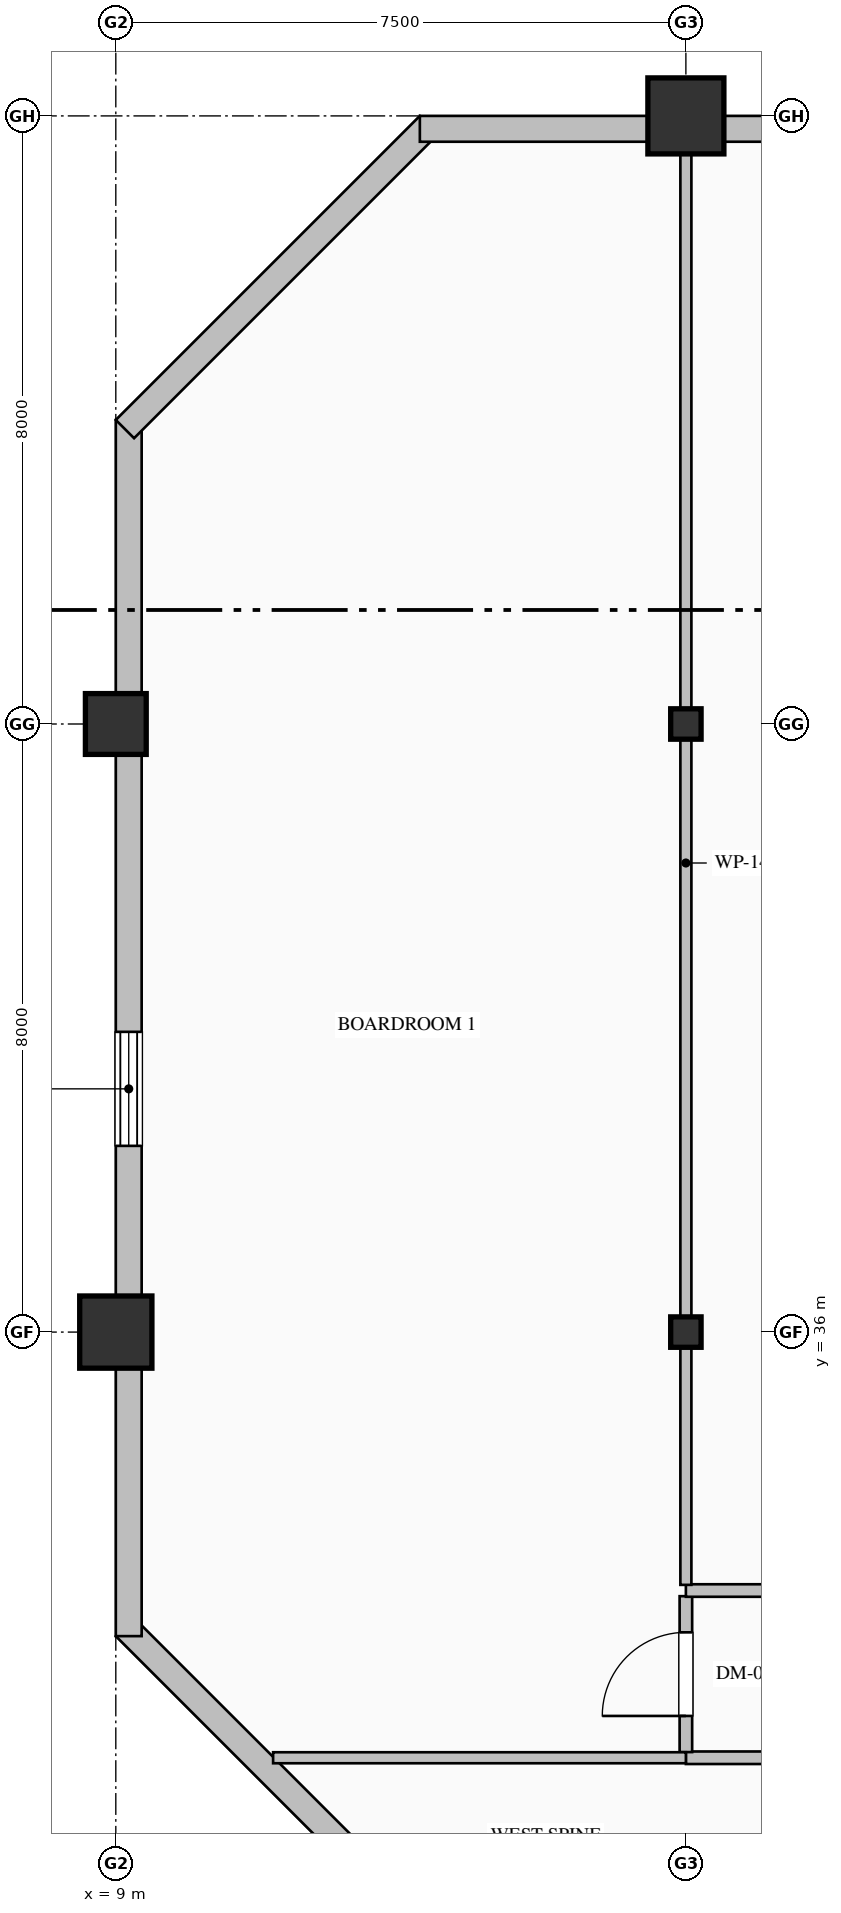
"""IFC4 building model, lengths in metres.
Left out: names, types, materials, properties, quantities, classifications, styles, units other than length and angle.
Written with IfcOpenShell. Run it as: python <this file> out.ifc"""

import sys

from ifc_helpers import new_model, si_unit, direction, frame, frame_2d, origin, origin_2d, place, context, subcontext, project, spatial, rectangle, hollow_rectangle, hollow_circle, i_section, extrude, element, fill, save


model = new_model("IFC4")
c1 = context("Model", 3, precision=1e-05, world=origin(), true_north=direction((0.0, 1.0)))
c2 = subcontext(c1, "Body", "Model", "MODEL_VIEW")
j1 = project(units=[si_unit("LENGTHUNIT", "METRE"), si_unit("PLANEANGLEUNIT", "RADIAN")], contexts=[c1])
p1 = place(None, origin())
s1 = spatial("IfcSite", under=j1, at=p1, CompositionType="ELEMENT")
p2 = place(p1, origin())
s2 = spatial("IfcBuilding", under=s1, at=p2, CompositionType="ELEMENT")
p3 = place(p2, frame((0.0, 0.0, 217.8)))
s3 = spatial("IfcBuildingStorey", under=s2, at=p3, CompositionType="ELEMENT", Elevation=217.8)
p4 = place(p3, frame((9.0, 36.0, 0.0), z_axis=(0.0, 0.0, 1.0), x_axis=(1.0, 0.0, 0.0)))
e1 = element("IfcColumn", 1, at=p4, inside=s3, PredefinedType="COLUMN", context=c2, shape_type="SweptSolid", body=[
    extrude(hollow_rectangle(XDim=0.95, YDim=0.95, WallThickness=0.036, at=origin_2d()), origin(), (0.0, 0.0, 1.0), 4.0),
])
p5 = place(p3, frame((9.0, 44.0, 0.0), z_axis=(0.0, 0.0, 1.0), x_axis=(1.0, 0.0, 0.0)))
e2 = element("IfcColumn", 2, at=p5, inside=s3, PredefinedType="COLUMN", context=c2, shape_type="SweptSolid", body=[
    extrude(hollow_rectangle(XDim=0.8, YDim=0.8, WallThickness=0.032, at=origin_2d()), origin(), (0.0, 0.0, 1.0), 4.0),
])
for number, where, z_axis, x_axis in (
    (3, (16.5, 36.0, 0.0), (0.0, 0.0, 1.0), (1.0, 0.0, 0.0)),
    (4, (16.5, 44.0, 0.0), (0.0, 0.0, 1.0), (1.0, 0.0, 0.0)),
):
    element("IfcColumn", number, at=place(p3, frame(where, z_axis=z_axis, x_axis=x_axis)), inside=s3, PredefinedType="COLUMN", context=c2, shape_type="SweptSolid", body=[
        extrude(i_section(OverallWidth=0.4, OverallDepth=0.4, WebThickness=0.013, FlangeThickness=0.021, FilletRadius=0.022, at=origin_2d()), origin(), (0.0, 0.0, 1.0), 4.0),
    ])
p6 = place(p3, frame((16.5, 52.0, 0.0), z_axis=(0.0, 0.0, 1.0), x_axis=(1.0, 0.0, 0.0)))
e5 = element("IfcColumn", 5, at=p6, inside=s3, PredefinedType="COLUMN", context=c2, shape_type="SweptSolid", body=[
    extrude(hollow_circle(Radius=0.5, WallThickness=0.036, at=origin_2d()), origin(), (0.0, 0.0, 1.0), 4.0),
])
p7 = place(p3, frame((13.12, 28.12, 0.0), z_axis=(0.0, 0.0, 1.0), x_axis=(-0.707106781187, 0.707106781187, 0.0)))
e6 = element("IfcWall", 6, at=p7, inside=s3, PredefinedType="SOLIDWALL", context=c2, shape_type="SweptSolid", body=[
    extrude(rectangle(XDim=5.657, YDim=0.34, at=frame_2d((2.828, 0.0))), origin(), (0.0, 0.0, 1.0), 3.775),
])
p8 = place(p3, frame((9.17, 32.0, 0.0), z_axis=(0.0, 0.0, 1.0), x_axis=(0.0, 1.0, 0.0)))
e7 = element("IfcWall", 7, at=p8, inside=s3, PredefinedType="SOLIDWALL", context=c2, shape_type="SweptSolid", body=[
    extrude(rectangle(XDim=16.0, YDim=0.34, at=frame_2d((8.0, 0.0))), origin(), (0.0, 0.0, 1.0), 3.325),
])
p9 = place(p8, frame((6.45, 0.0, 0.7)))
e8 = element("IfcOpeningElement", 8, at=p9, cuts=e7, PredefinedType="OPENING", context=c2, shape_type="SweptSolid", body=[
    extrude(rectangle(XDim=1.5, YDim=2.4, at=frame_2d((0.75, 1.2))), frame((0.0, 0.18, 0.0), z_axis=(0.0, -1.0, 0.0), x_axis=(1.0, 0.0, 0.0)), (0.0, 0.0, 1.0), 0.36),
])
p10 = place(p3, frame((9.12, 47.88, 0.0), z_axis=(0.0, 0.0, 1.0), x_axis=(0.707106781187, 0.707106781187, 0.0)))
e9 = element("IfcWall", 9, at=p10, inside=s3, PredefinedType="SOLIDWALL", context=c2, shape_type="SweptSolid", body=[
    extrude(rectangle(XDim=5.657, YDim=0.34, at=frame_2d((2.828, 0.0))), origin(), (0.0, 0.0, 1.0), 3.775),
])
p11 = place(p3, frame((13.0, 51.83, 0.0), z_axis=(0.0, 0.0, 1.0), x_axis=(1.0, 0.0, 0.0)))
e10 = element("IfcWall", 10, at=p11, inside=s3, PredefinedType="SOLIDWALL", context=c2, shape_type="SweptSolid", body=[
    extrude(rectangle(XDim=27.52, YDim=0.34, at=frame_2d((13.76, 0.0))), origin(), (0.0, 0.0, 1.0), 3.325),
])
p12 = place(p11, frame((6.525, 0.0, 0.9)))
e11 = element("IfcOpeningElement", 11, at=p12, cuts=e10, PredefinedType="OPENING", context=c2, shape_type="SweptSolid", body=[
    extrude(rectangle(XDim=1.35, YDim=1.85, at=frame_2d((0.675, 0.925))), frame((0.0, 0.18, 0.0), z_axis=(0.0, -1.0, 0.0), x_axis=(1.0, 0.0, 0.0)), (0.0, 0.0, 1.0), 0.36),
])
p13 = place(p3, frame((37.8, 30.4, 0.0), z_axis=(0.0, 0.0, 1.0), x_axis=(-1.0, 0.0, 0.0)))
e12 = element("IfcWall", 12, at=p13, inside=s3, PredefinedType="PARTITIONING", context=c2, shape_type="SweptSolid", body=[
    extrude(rectangle(XDim=21.3, YDim=0.165, at=frame_2d((10.65, 0.0))), origin(), (0.0, 0.0, 1.0), 3.775),
])
p14 = place(p13, frame((10.15, 0.0, 0.0)))
e13 = element("IfcOpeningElement", 13, at=p14, cuts=e12, PredefinedType="OPENING", context=c2, shape_type="SweptSolid", body=[
    extrude(rectangle(XDim=1.0, YDim=2.15, at=frame_2d((0.5, 1.075))), frame((0.0, 0.093, 0.0), z_axis=(0.0, -1.0, 0.0), x_axis=(1.0, 0.0, 0.0)), (0.0, 0.0, 1.0), 0.185),
])
p15 = place(p3, frame((16.5, 30.475, 0.0), z_axis=(0.0, 0.0, 1.0), x_axis=(0.0, 1.0, 0.0)))
e14 = element("IfcWall", 14, at=p15, inside=s3, PredefinedType="PARTITIONING", context=c2, shape_type="SweptSolid", body=[
    extrude(rectangle(XDim=2.051, YDim=0.165, at=frame_2d((1.025, 0.0))), origin(), (0.0, 0.0, 1.0), 3.179),
])
p16 = place(p15, frame((0.476, 0.0, 0.0)))
e15 = element("IfcOpeningElement", 15, at=p16, cuts=e14, PredefinedType="OPENING", context=c2, shape_type="SweptSolid", body=[
    extrude(rectangle(XDim=1.1, YDim=2.2, at=frame_2d((0.55, 1.1))), frame((0.0, 0.093, 0.0), z_axis=(0.0, -1.0, 0.0), x_axis=(1.0, 0.0, 0.0)), (0.0, 0.0, 1.0), 0.185),
])
p17 = place(p3, frame((16.5, 32.6, 0.0), z_axis=(0.0, 0.0, 1.0), x_axis=(1.0, 0.0, 0.0)))
e16 = element("IfcWall", 16, at=p17, inside=s3, PredefinedType="PARTITIONING", context=c2, shape_type="SweptSolid", body=[
    extrude(rectangle(XDim=8.0, YDim=0.165, at=frame_2d((4.0, 0.0))), origin(), (0.0, 0.0, 1.0), 3.775),
])
p18 = place(p17, frame((3.45, 0.0, 0.0)))
e17 = element("IfcOpeningElement", 17, at=p18, cuts=e16, PredefinedType="OPENING", context=c2, shape_type="SweptSolid", body=[
    extrude(rectangle(XDim=1.1, YDim=2.2, at=frame_2d((0.55, 1.1))), frame((0.0, 0.093, 0.0), z_axis=(0.0, -1.0, 0.0), x_axis=(1.0, 0.0, 0.0)), (0.0, 0.0, 1.0), 0.185),
])
p19 = place(p3, frame((11.07, 30.4, 0.0), z_axis=(0.0, 0.0, 1.0), x_axis=(1.0, 0.0, 0.0)))
e18 = element("IfcWall", 18, at=p19, inside=s3, PredefinedType="PARTITIONING", context=c2, shape_type="SweptSolid", body=[
    extrude(rectangle(XDim=5.43, YDim=0.145, at=frame_2d((2.715, 0.0))), origin(), (0.0, 0.0, 1.0), 3.775),
])
p20 = place(p3, frame((16.5, 51.668, 0.0), z_axis=(0.0, 0.0, 1.0), x_axis=(0.0, -1.0, 0.0)))
e19 = element("IfcWall", 19, at=p20, inside=s3, PredefinedType="PARTITIONING", context=c2, shape_type="SweptSolid", body=[
    extrude(rectangle(XDim=18.993, YDim=0.145, at=frame_2d((9.497, 0.0))), origin(), (0.0, 0.0, 1.0), 3.179),
])
p21 = place(p9, origin())
e20 = element("IfcWindow", 20, at=p21, inside=s3, PartitioningType="DOUBLE_PANEL_HORIZONTAL", PredefinedType="WINDOW", context=c2, shape_type="SweptSolid", body=[
    extrude(rectangle(XDim=1.5, YDim=2.4, at=frame_2d((0.75, 1.2))), frame((0.0, 0.15, 0.0), z_axis=(0.0, -1.0, 0.0), x_axis=(1.0, 0.0, 0.0)), (0.0, 0.0, 1.0), 0.06),
])
fill(e8, e20)
p22 = place(p16, origin())
e21 = element("IfcDoor", 21, at=p22, inside=s3, OperationType="SINGLE_SWING_LEFT", PredefinedType="DOOR", context=c2, shape_type="SweptSolid", body=[
    extrude(rectangle(XDim=1.1, YDim=2.2, at=frame_2d((0.55, 1.1))), frame((0.0, 0.025, 0.0), z_axis=(0.0, -1.0, 0.0), x_axis=(1.0, 0.0, 0.0)), (0.0, 0.0, 1.0), 0.05),
])
fill(e15, e21)
save(model, sys.argv[1])
